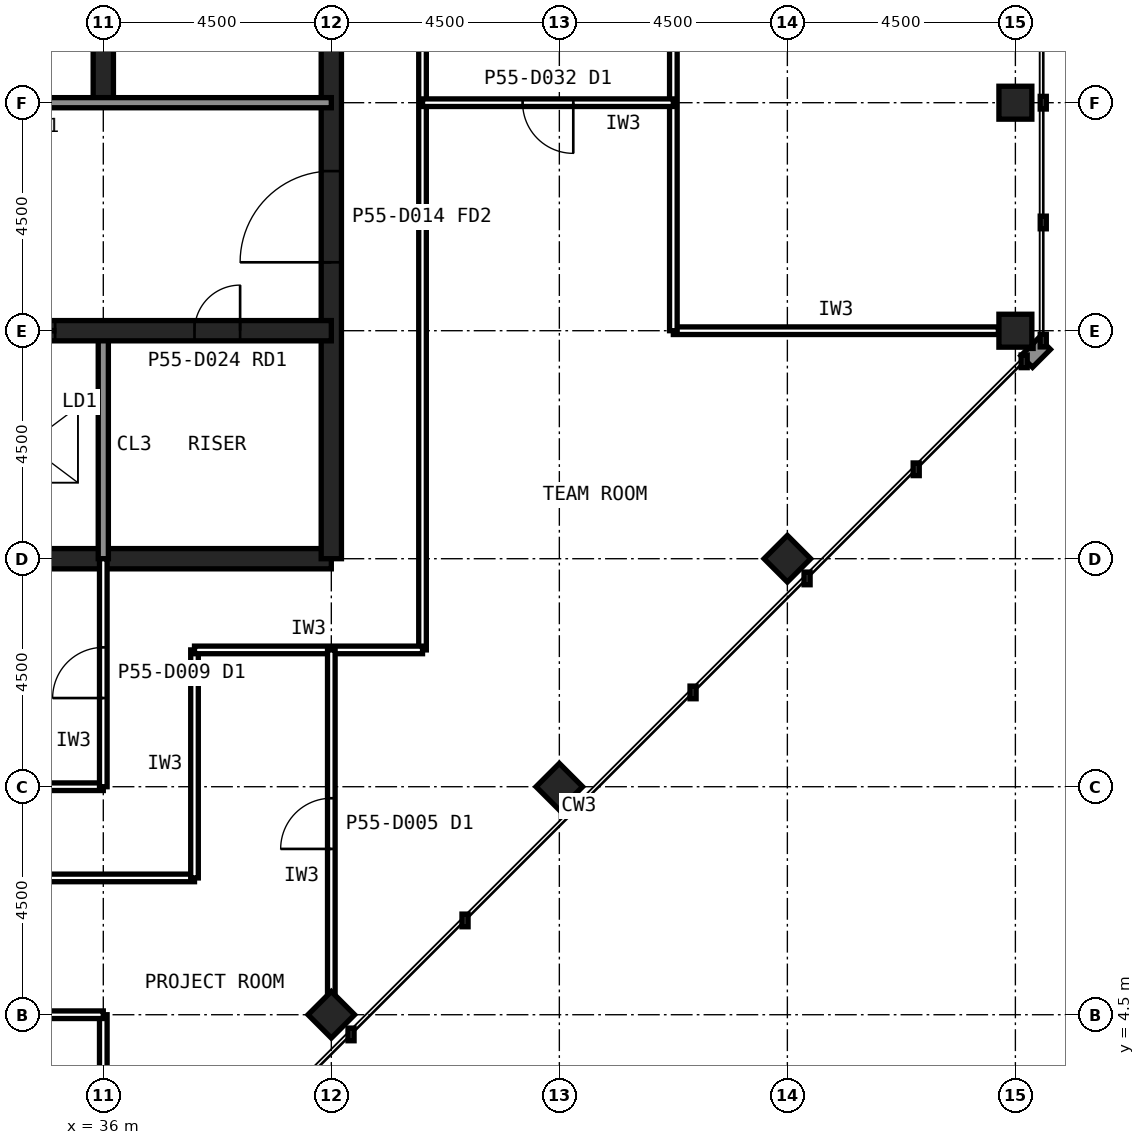
"""IFC4 building model, lengths in metres.
Left out: names, types, materials, properties, quantities, classifications, styles, units other than length and angle.
Written with IfcOpenShell. Run it as: python <this file> out.ifc"""

import sys

from ifc_helpers import new_model, si_unit, direction, frame, frame_2d, origin, origin_2d, place, context, subcontext, project, spatial, rectangle, hollow_rectangle, extrude, element, fill, save


model = new_model("IFC4")
c1 = context("Model", 3, precision=1e-05, world=origin(), true_north=direction((0.0, 1.0)))
c2 = subcontext(c1, "Body", "Model", "MODEL_VIEW")
j1 = project(units=[si_unit("LENGTHUNIT", "METRE"), si_unit("PLANEANGLEUNIT", "RADIAN")], contexts=[c1])
p1 = place(None, origin())
s1 = spatial("IfcSite", under=j1, at=p1, CompositionType="ELEMENT")
p2 = place(p1, origin())
s2 = spatial("IfcBuilding", under=s1, at=p2, CompositionType="ELEMENT")
p3 = place(p2, frame((0.0, 0.0, 230.6)))
s3 = spatial("IfcBuildingStorey", under=s2, at=p3, CompositionType="ELEMENT", Elevation=230.6)
for number, where, z_axis, x_axis in (
    (1, (54.0, 18.0, 0.0), (0.0, 0.0, 1.0), (1.0, 0.0, 0.0)),
    (2, (54.0, 22.5, 0.0), (0.0, 0.0, 1.0), (1.0, 0.0, 0.0)),
    (3, (40.5, 4.5, 0.0), (0.0, 0.0, 1.0), (0.707, 0.707, 0.0)),
    (4, (45.0, 9.0, 0.0), (0.0, 0.0, 1.0), (0.707, 0.707, 0.0)),
    (5, (49.5, 13.5, 0.0), (0.0, 0.0, 1.0), (0.707, 0.707, 0.0)),
):
    element("IfcColumn", number, at=place(p3, frame(where, z_axis=z_axis, x_axis=x_axis)), inside=s3, PredefinedType="COLUMN", context=c2, shape_type="SweptSolid", body=[
        extrude(hollow_rectangle(XDim=0.65, YDim=0.65, WallThickness=0.032, at=origin_2d()), origin(), (0.0, 0.0, 1.0), 4.0),
    ])
p4 = place(p3, frame((13.5, 13.5, 0.0), z_axis=(0.0, 0.0, 1.0), x_axis=(1.0, 0.0, 0.0)))
e6 = element("IfcWall", 6, at=p4, inside=s3, PredefinedType="SHEAR", context=c2, shape_type="SweptSolid", body=[
    extrude(rectangle(XDim=27.0, YDim=0.4, at=frame_2d((13.5, 0.0))), origin(), (0.0, 0.0, 1.0), 4.0),
])
p5 = place(p3, frame((40.5, 13.5, 0.0), z_axis=(0.0, 0.0, 1.0), x_axis=(0.0, 1.0, 0.0)))
e7 = element("IfcWall", 7, at=p5, inside=s3, PredefinedType="SHEAR", context=c2, shape_type="SweptSolid", body=[
    extrude(rectangle(XDim=27.0, YDim=0.4, at=frame_2d((13.5, 0.0))), origin(), (0.0, 0.0, 1.0), 4.0),
])
p6 = place(p5, frame((5.85, 0.0, 0.0)))
e8 = element("IfcOpeningElement", 8, at=p6, cuts=e7, PredefinedType="OPENING", context=c2, shape_type="SweptSolid", body=[
    extrude(rectangle(XDim=1.8, YDim=2.1, at=frame_2d((0.9, 1.05))), frame((0.0, 0.21, 0.0), z_axis=(0.0, -1.0, 0.0), x_axis=(1.0, 0.0, 0.0)), (0.0, 0.0, 1.0), 0.42),
])
p7 = place(p5, frame((19.65, 0.0, 0.0)))
e9 = element("IfcOpeningElement", 9, at=p7, cuts=e7, PredefinedType="OPENING", context=c2, shape_type="SweptSolid", body=[
    extrude(rectangle(XDim=1.2, YDim=2.1, at=frame_2d((0.6, 1.05))), frame((0.0, 0.21, 0.0), z_axis=(0.0, -1.0, 0.0), x_axis=(1.0, 0.0, 0.0)), (0.0, 0.0, 1.0), 0.42),
])
p8 = place(p3, frame((36.0, 13.5, 0.0), z_axis=(0.0, 0.0, 1.0), x_axis=(0.0, 1.0, 0.0)))
e10 = element("IfcWall", 10, at=p8, inside=s3, PredefinedType="SOLIDWALL", context=c2, shape_type="SweptSolid", body=[
    extrude(rectangle(XDim=4.5, YDim=0.2, at=frame_2d((2.25, 0.0))), origin(), (0.0, 0.0, 1.0), 3.84),
])
p9 = place(p3, frame((36.0, 22.5, 0.0), z_axis=(0.0, 0.0, 1.0), x_axis=(0.0, 1.0, 0.0)))
e11 = element("IfcWall", 11, at=p9, inside=s3, PredefinedType="SHEAR", context=c2, shape_type="SweptSolid", body=[
    extrude(rectangle(XDim=18.0, YDim=0.4, at=frame_2d((9.0, 0.0))), origin(), (0.0, 0.0, 1.0), 4.0),
])
p10 = place(p3, frame((13.5, 18.0, 0.0), z_axis=(0.0, 0.0, 1.0), x_axis=(1.0, 0.0, 0.0)))
e12 = element("IfcWall", 12, at=p10, inside=s3, PredefinedType="SHEAR", context=c2, shape_type="SweptSolid", body=[
    extrude(rectangle(XDim=27.0, YDim=0.4, at=frame_2d((13.5, 0.0))), origin(), (0.0, 0.0, 1.0), 4.0),
])
p11 = place(p10, frame((24.3, 0.0, 0.0)))
e13 = element("IfcOpeningElement", 13, at=p11, cuts=e12, PredefinedType="OPENING", context=c2, shape_type="SweptSolid", body=[
    extrude(rectangle(XDim=0.9, YDim=2.1, at=frame_2d((0.45, 1.05))), frame((0.0, 0.21, 0.0), z_axis=(0.0, -1.0, 0.0), x_axis=(1.0, 0.0, 0.0)), (0.0, 0.0, 1.0), 0.42),
])
p12 = place(p10, frame((5.45, 0.0, 0.0)))
e14 = element("IfcOpeningElement", 14, at=p12, cuts=e12, PredefinedType="OPENING", context=c2, shape_type="SweptSolid", body=[
    extrude(rectangle(XDim=1.1, YDim=2.1, at=frame_2d((0.55, 1.05))), frame((0.0, 0.21, 0.0), z_axis=(0.0, -1.0, 0.0), x_axis=(1.0, 0.0, 0.0)), (0.0, 0.0, 1.0), 0.42),
])
p13 = place(p10, frame((8.45, 0.0, 0.0)))
e15 = element("IfcOpeningElement", 15, at=p13, cuts=e12, PredefinedType="OPENING", context=c2, shape_type="SweptSolid", body=[
    extrude(rectangle(XDim=1.1, YDim=2.1, at=frame_2d((0.55, 1.05))), frame((0.0, 0.21, 0.0), z_axis=(0.0, -1.0, 0.0), x_axis=(1.0, 0.0, 0.0)), (0.0, 0.0, 1.0), 0.42),
])
p14 = place(p10, frame((11.45, 0.0, 0.0)))
e16 = element("IfcOpeningElement", 16, at=p14, cuts=e12, PredefinedType="OPENING", context=c2, shape_type="SweptSolid", body=[
    extrude(rectangle(XDim=1.1, YDim=2.1, at=frame_2d((0.55, 1.05))), frame((0.0, 0.21, 0.0), z_axis=(0.0, -1.0, 0.0), x_axis=(1.0, 0.0, 0.0)), (0.0, 0.0, 1.0), 0.42),
])
p15 = place(p10, frame((14.45, 0.0, 0.0)))
e17 = element("IfcOpeningElement", 17, at=p15, cuts=e12, PredefinedType="OPENING", context=c2, shape_type="SweptSolid", body=[
    extrude(rectangle(XDim=1.1, YDim=2.1, at=frame_2d((0.55, 1.05))), frame((0.0, 0.21, 0.0), z_axis=(0.0, -1.0, 0.0), x_axis=(1.0, 0.0, 0.0)), (0.0, 0.0, 1.0), 0.42),
])
p16 = place(p10, frame((17.45, 0.0, 0.0)))
e18 = element("IfcOpeningElement", 18, at=p16, cuts=e12, PredefinedType="OPENING", context=c2, shape_type="SweptSolid", body=[
    extrude(rectangle(XDim=1.1, YDim=2.1, at=frame_2d((0.55, 1.05))), frame((0.0, 0.21, 0.0), z_axis=(0.0, -1.0, 0.0), x_axis=(1.0, 0.0, 0.0)), (0.0, 0.0, 1.0), 0.42),
])
p17 = place(p10, frame((20.45, 0.0, 0.0)))
e19 = element("IfcOpeningElement", 19, at=p17, cuts=e12, PredefinedType="OPENING", context=c2, shape_type="SweptSolid", body=[
    extrude(rectangle(XDim=1.1, YDim=2.1, at=frame_2d((0.55, 1.05))), frame((0.0, 0.21, 0.0), z_axis=(0.0, -1.0, 0.0), x_axis=(1.0, 0.0, 0.0)), (0.0, 0.0, 1.0), 0.42),
])
p18 = place(p10, frame((1.6, 0.0, 0.0)))
e20 = element("IfcOpeningElement", 20, at=p18, cuts=e12, PredefinedType="OPENING", context=c2, shape_type="SweptSolid", body=[
    extrude(rectangle(XDim=1.3, YDim=2.2, at=frame_2d((0.65, 1.1))), frame((0.0, 0.21, 0.0), z_axis=(0.0, -1.0, 0.0), x_axis=(1.0, 0.0, 0.0)), (0.0, 0.0, 1.0), 0.42),
])
p19 = place(p3, frame((13.5, 22.5, 0.0), z_axis=(0.0, 0.0, 1.0), x_axis=(1.0, 0.0, 0.0)))
e21 = element("IfcWall", 21, at=p19, inside=s3, PredefinedType="SOLIDWALL", context=c2, shape_type="SweptSolid", body=[
    extrude(rectangle(XDim=27.0, YDim=0.2, at=frame_2d((13.5, 0.0))), origin(), (0.0, 0.0, 1.0), 3.84),
])
p20 = place(p19, frame((1.65, 0.0, 0.0)))
e22 = element("IfcOpeningElement", 22, at=p20, cuts=e21, PredefinedType="OPENING", context=c2, shape_type="SweptSolid", body=[
    extrude(rectangle(XDim=1.2, YDim=2.1, at=frame_2d((0.6, 1.05))), frame((0.0, 0.11, 0.0), z_axis=(0.0, -1.0, 0.0), x_axis=(1.0, 0.0, 0.0)), (0.0, 0.0, 1.0), 0.22),
])
p21 = place(p19, frame((6.025, 0.0, 0.0)))
e23 = element("IfcOpeningElement", 23, at=p21, cuts=e21, PredefinedType="OPENING", context=c2, shape_type="SweptSolid", body=[
    extrude(rectangle(XDim=1.0, YDim=2.1, at=frame_2d((0.5, 1.05))), frame((0.0, 0.11, 0.0), z_axis=(0.0, -1.0, 0.0), x_axis=(1.0, 0.0, 0.0)), (0.0, 0.0, 1.0), 0.22),
])
p22 = place(p19, frame((10.525, 0.0, 0.0)))
e24 = element("IfcOpeningElement", 24, at=p22, cuts=e21, PredefinedType="OPENING", context=c2, shape_type="SweptSolid", body=[
    extrude(rectangle(XDim=1.0, YDim=2.1, at=frame_2d((0.5, 1.05))), frame((0.0, 0.11, 0.0), z_axis=(0.0, -1.0, 0.0), x_axis=(1.0, 0.0, 0.0)), (0.0, 0.0, 1.0), 0.22),
])
p23 = place(p19, frame((19.75, 0.0, 0.0)))
e25 = element("IfcOpeningElement", 25, at=p23, cuts=e21, PredefinedType="OPENING", context=c2, shape_type="SweptSolid", body=[
    extrude(rectangle(XDim=1.0, YDim=2.1, at=frame_2d((0.5, 1.05))), frame((0.0, 0.11, 0.0), z_axis=(0.0, -1.0, 0.0), x_axis=(1.0, 0.0, 0.0)), (0.0, 0.0, 1.0), 0.22),
])
p24 = place(p19, frame((15.05, 0.0, 0.0)))
e26 = element("IfcOpeningElement", 26, at=p24, cuts=e21, PredefinedType="OPENING", context=c2, shape_type="SweptSolid", body=[
    extrude(rectangle(XDim=1.4, YDim=2.4, at=frame_2d((0.7, 1.2))), frame((0.0, 0.11, 0.0), z_axis=(0.0, -1.0, 0.0), x_axis=(1.0, 0.0, 0.0)), (0.0, 0.0, 1.0), 0.22),
])
p25 = place(p3, frame((42.3, 11.7, 0.0), z_axis=(0.0, 0.0, 1.0), x_axis=(0.0, 1.0, 0.0)))
e27 = element("IfcWall", 27, at=p25, inside=s3, PredefinedType="PARTITIONING", context=c2, shape_type="SweptSolid", body=[
    extrude(rectangle(XDim=34.2, YDim=0.15, at=frame_2d((17.1, 0.0))), origin(), (0.0, 0.0, 1.0), 3.84),
])
p26 = place(p25, frame((16.6, 0.0, 0.0)))
e28 = element("IfcOpeningElement", 28, at=p26, cuts=e27, PredefinedType="OPENING", context=c2, shape_type="SweptSolid", body=[
    extrude(rectangle(XDim=1.0, YDim=2.1, at=frame_2d((0.5, 1.05))), frame((0.0, 0.085, 0.0), z_axis=(0.0, -1.0, 0.0), x_axis=(1.0, 0.0, 0.0)), (0.0, 0.0, 1.0), 0.17),
])
p27 = place(p3, frame((28.8, 7.2, 0.0), z_axis=(0.0, 0.0, 1.0), x_axis=(1.0, 0.0, 0.0)))
e29 = element("IfcWall", 29, at=p27, inside=s3, PredefinedType="PARTITIONING", context=c2, shape_type="SweptSolid", body=[
    extrude(rectangle(XDim=9.0, YDim=0.15, at=frame_2d((4.5, 0.0))), origin(), (0.0, 0.0, 1.0), 3.84),
])
for number, where, z_axis, x_axis in (
    (30, (37.8, 7.2, 0.0), (0.0, 0.0, 1.0), (0.0, 1.0, 0.0)),
    (31, (37.8, 11.7, 0.0), (0.0, 0.0, 1.0), (1.0, 0.0, 0.0)),
):
    element("IfcWall", number, at=place(p3, frame(where, z_axis=z_axis, x_axis=x_axis)), inside=s3, PredefinedType="PARTITIONING", context=c2, shape_type="SweptSolid", body=[
        extrude(rectangle(XDim=4.5, YDim=0.15, at=frame_2d((2.25, 0.0))), origin(), (0.0, 0.0, 1.0), 3.84),
    ])
p28 = place(p3, frame((47.25, 18.0, 0.0), z_axis=(0.0, 0.0, 1.0), x_axis=(1.0, 0.0, 0.0)))
e32 = element("IfcWall", 32, at=p28, inside=s3, PredefinedType="PARTITIONING", context=c2, shape_type="SweptSolid", body=[
    extrude(rectangle(XDim=6.415, YDim=0.15, at=frame_2d((3.208, 0.0))), origin(), (0.0, 0.0, 1.0), 2.989),
])
p29 = place(p3, frame((47.25, 36.0, 0.0), z_axis=(0.0, 0.0, 1.0), x_axis=(0.0, -1.0, 0.0)))
e33 = element("IfcWall", 33, at=p29, inside=s3, PredefinedType="PARTITIONING", context=c2, shape_type="SweptSolid", body=[
    extrude(rectangle(XDim=18.0, YDim=0.15, at=frame_2d((9.0, 0.0))), origin(), (0.0, 0.0, 1.0), 3.84),
])
p30 = place(p29, frame((8.1, 0.0, 0.0)))
e34 = element("IfcOpeningElement", 34, at=p30, cuts=e33, PredefinedType="OPENING", context=c2, shape_type="SweptSolid", body=[
    extrude(rectangle(XDim=1.8, YDim=2.4, at=frame_2d((0.9, 1.2))), frame((0.0, 0.085, 0.0), z_axis=(0.0, -1.0, 0.0), x_axis=(1.0, 0.0, 0.0)), (0.0, 0.0, 1.0), 0.17),
])
p31 = place(p3, frame((27.0, 9.0, 0.0), z_axis=(0.0, 0.0, 1.0), x_axis=(1.0, 0.0, 0.0)))
e35 = element("IfcWall", 35, at=p31, inside=s3, PredefinedType="PARTITIONING", context=c2, shape_type="SweptSolid", body=[
    extrude(rectangle(XDim=9.0, YDim=0.15, at=frame_2d((4.5, 0.0))), origin(), (0.0, 0.0, 1.0), 3.84),
])
p32 = place(p3, frame((36.0, 9.0, 0.0), z_axis=(0.0, 0.0, 1.0), x_axis=(0.0, 1.0, 0.0)))
e36 = element("IfcWall", 36, at=p32, inside=s3, PredefinedType="PARTITIONING", context=c2, shape_type="SweptSolid", body=[
    extrude(rectangle(XDim=4.5, YDim=0.15, at=frame_2d((2.25, 0.0))), origin(), (0.0, 0.0, 1.0), 2.989),
])
p33 = place(p32, frame((1.75, 0.0, 0.0)))
e37 = element("IfcOpeningElement", 37, at=p33, cuts=e36, PredefinedType="OPENING", context=c2, shape_type="SweptSolid", body=[
    extrude(rectangle(XDim=1.0, YDim=2.1, at=frame_2d((0.5, 1.05))), frame((0.0, 0.085, 0.0), z_axis=(0.0, -1.0, 0.0), x_axis=(1.0, 0.0, 0.0)), (0.0, 0.0, 1.0), 0.17),
])
p34 = place(p3, frame((36.0, 0.335, 0.0), z_axis=(0.0, 0.0, 1.0), x_axis=(0.0, 1.0, 0.0)))
e38 = element("IfcWall", 38, at=p34, inside=s3, PredefinedType="PARTITIONING", context=c2, shape_type="SweptSolid", body=[
    extrude(rectangle(XDim=4.165, YDim=0.15, at=frame_2d((2.083, 0.0))), origin(), (0.0, 0.0, 1.0), 2.989),
])
p35 = place(p3, frame((36.0, 4.5, 0.0), z_axis=(0.0, 0.0, 1.0), x_axis=(-1.0, 0.0, 0.0)))
e39 = element("IfcWall", 39, at=p35, inside=s3, PredefinedType="PARTITIONING", context=c2, shape_type="SweptSolid", body=[
    extrude(rectangle(XDim=9.0, YDim=0.15, at=frame_2d((4.5, 0.0))), origin(), (0.0, 0.0, 1.0), 3.84),
])
p36 = place(p35, frame((3.25, 0.0, 0.0)))
e40 = element("IfcOpeningElement", 40, at=p36, cuts=e39, PredefinedType="OPENING", context=c2, shape_type="SweptSolid", body=[
    extrude(rectangle(XDim=1.0, YDim=2.1, at=frame_2d((0.5, 1.05))), frame((0.0, 0.085, 0.0), z_axis=(0.0, -1.0, 0.0), x_axis=(1.0, 0.0, 0.0)), (0.0, 0.0, 1.0), 0.17),
])
p37 = place(p3, frame((47.25, 22.5, 0.0), z_axis=(0.0, 0.0, 1.0), x_axis=(-1.0, 0.0, 0.0)))
e41 = element("IfcWall", 41, at=p37, inside=s3, PredefinedType="PARTITIONING", context=c2, shape_type="SweptSolid", body=[
    extrude(rectangle(XDim=4.95, YDim=0.15, at=frame_2d((2.475, 0.0))), origin(), (0.0, 0.0, 1.0), 2.989),
])
p38 = place(p37, frame((1.975, 0.0, 0.0)))
e42 = element("IfcOpeningElement", 42, at=p38, cuts=e41, PredefinedType="OPENING", context=c2, shape_type="SweptSolid", body=[
    extrude(rectangle(XDim=1.0, YDim=2.1, at=frame_2d((0.5, 1.05))), frame((0.0, 0.085, 0.0), z_axis=(0.0, -1.0, 0.0), x_axis=(1.0, 0.0, 0.0)), (0.0, 0.0, 1.0), 0.17),
])
p39 = place(p3, frame((40.5, 4.845, 0.0), z_axis=(0.0, 0.0, 1.0), x_axis=(0.0, 1.0, 0.0)))
e43 = element("IfcWall", 43, at=p39, inside=s3, PredefinedType="PARTITIONING", context=c2, shape_type="SweptSolid", body=[
    extrude(rectangle(XDim=6.855, YDim=0.15, at=frame_2d((3.427, 0.0))), origin(), (0.0, 0.0, 1.0), 2.989),
])
p40 = place(p39, frame((2.927, 0.0, 0.0)))
e44 = element("IfcOpeningElement", 44, at=p40, cuts=e43, PredefinedType="OPENING", context=c2, shape_type="SweptSolid", body=[
    extrude(rectangle(XDim=1.0, YDim=2.1, at=frame_2d((0.5, 1.05))), frame((0.0, 0.085, 0.0), z_axis=(0.0, -1.0, 0.0), x_axis=(1.0, 0.0, 0.0)), (0.0, 0.0, 1.0), 0.17),
])
p41 = place(p6, origin())
e45 = element("IfcDoor", 45, at=p41, inside=s3, OperationType="SINGLE_SWING_LEFT", PredefinedType="DOOR", context=c2, shape_type="SweptSolid", body=[
    extrude(rectangle(XDim=1.8, YDim=2.1, at=frame_2d((0.9, 1.05))), frame((0.0, 0.025, 0.0), z_axis=(0.0, -1.0, 0.0), x_axis=(1.0, 0.0, 0.0)), (0.0, 0.0, 1.0), 0.05),
])
fill(e8, e45)
p42 = place(p11, origin())
e46 = element("IfcDoor", 46, at=p42, inside=s3, OperationType="SINGLE_SWING_RIGHT", PredefinedType="DOOR", context=c2, shape_type="SweptSolid", body=[
    extrude(rectangle(XDim=0.9, YDim=2.1, at=frame_2d((0.45, 1.05))), frame((0.0, 0.025, 0.0), z_axis=(0.0, -1.0, 0.0), x_axis=(1.0, 0.0, 0.0)), (0.0, 0.0, 1.0), 0.05),
])
fill(e13, e46)
p43 = place(p17, origin())
e47 = element("IfcDoor", 47, at=p43, inside=s3, OperationType="SLIDING_TO_LEFT", PredefinedType="DOOR", context=c2, shape_type="SweptSolid", body=[
    extrude(rectangle(XDim=1.1, YDim=2.1, at=frame_2d((0.55, 1.05))), frame((0.0, 0.025, 0.0), z_axis=(0.0, -1.0, 0.0), x_axis=(1.0, 0.0, 0.0)), (0.0, 0.0, 1.0), 0.05),
])
fill(e19, e47)
p44 = place(p33, origin())
e48 = element("IfcDoor", 48, at=p44, inside=s3, OperationType="SINGLE_SWING_LEFT", PredefinedType="DOOR", context=c2, shape_type="SweptSolid", body=[
    extrude(rectangle(XDim=1.0, YDim=2.1, at=frame_2d((0.5, 1.05))), frame((0.0, 0.025, 0.0), z_axis=(0.0, -1.0, 0.0), x_axis=(1.0, 0.0, 0.0)), (0.0, 0.0, 1.0), 0.05),
])
fill(e37, e48)
p45 = place(p38, origin())
e49 = element("IfcDoor", 49, at=p45, inside=s3, OperationType="SINGLE_SWING_LEFT", PredefinedType="DOOR", context=c2, shape_type="SweptSolid", body=[
    extrude(rectangle(XDim=1.0, YDim=2.1, at=frame_2d((0.5, 1.05))), frame((0.0, 0.025, 0.0), z_axis=(0.0, -1.0, 0.0), x_axis=(1.0, 0.0, 0.0)), (0.0, 0.0, 1.0), 0.05),
])
fill(e42, e49)
p46 = place(p40, origin())
e50 = element("IfcDoor", 50, at=p46, inside=s3, OperationType="SINGLE_SWING_LEFT", PredefinedType="DOOR", context=c2, shape_type="SweptSolid", body=[
    extrude(rectangle(XDim=1.0, YDim=2.1, at=frame_2d((0.5, 1.05))), frame((0.0, 0.025, 0.0), z_axis=(0.0, -1.0, 0.0), x_axis=(1.0, 0.0, 0.0)), (0.0, 0.0, 1.0), 0.05),
])
fill(e44, e50)
save(model, sys.argv[1])
